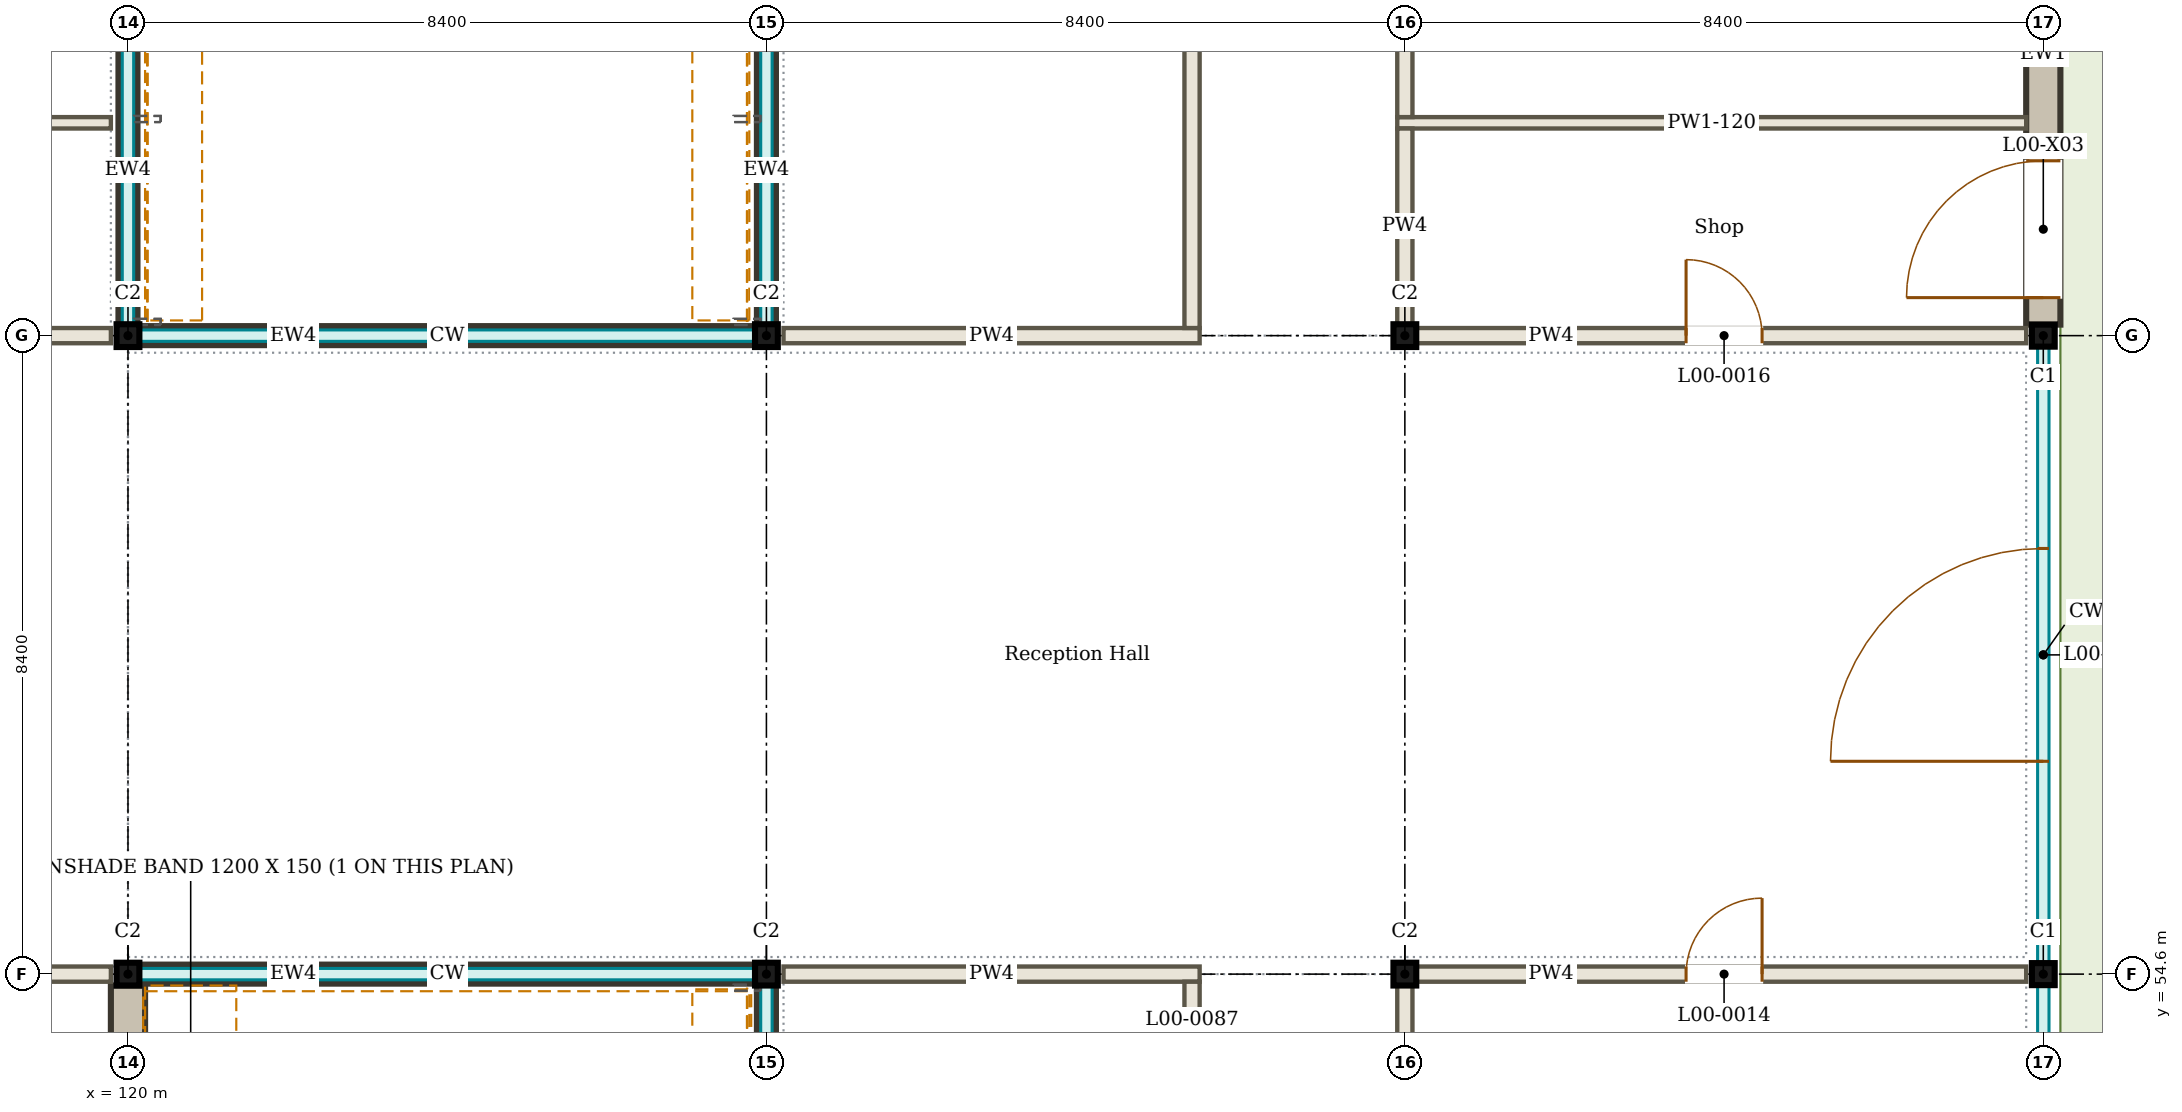
"""IFC4 building model, lengths in metres.
Left out: names, types, materials, properties, quantities, classifications, styles, units other than length and angle.
Written with IfcOpenShell. Run it as: python <this file> out.ifc"""

import sys

from ifc_helpers import new_model, si_unit, direction, frame, frame_2d, origin, origin_2d, place, context, subcontext, project, spatial, rectangle, i_section, extrude, element, fill, save


model = new_model("IFC4")
c1 = context("Model", 3, precision=1e-05, world=origin(), true_north=direction((0.0, 1.0)))
c2 = subcontext(c1, "Body", "Model", "MODEL_VIEW")
j1 = project(units=[si_unit("LENGTHUNIT", "METRE"), si_unit("PLANEANGLEUNIT", "RADIAN")], contexts=[c1])
p1 = place(None, origin())
s1 = spatial("IfcSite", under=j1, at=p1, CompositionType="ELEMENT")
p2 = place(p1, origin())
s2 = spatial("IfcBuilding", under=s1, at=p2, CompositionType="ELEMENT")
p3 = place(p2, origin())
s3 = spatial("IfcBuildingStorey", under=s2, at=p3, CompositionType="ELEMENT", Elevation=0.0)
for number, where, z_axis, x_axis in (
    (1, (120.0, 54.6, 0.0), (0.0, 0.0, 1.0), (1.0, 0.0, 0.0)),
    (2, (128.4, 54.6, 0.0), (0.0, 0.0, 1.0), (1.0, 0.0, 0.0)),
    (3, (136.8, 54.6, 0.0), (0.0, 0.0, 1.0), (1.0, 0.0, 0.0)),
):
    element("IfcColumn", number, at=place(p3, frame(where, z_axis=z_axis, x_axis=x_axis)), inside=s3, PredefinedType="COLUMN", context=c2, shape_type="SweptSolid", body=[
        extrude(i_section(OverallWidth=0.3, OverallDepth=0.3, WebThickness=0.011, FlangeThickness=0.019, FilletRadius=0.027, at=origin_2d()), origin(), (0.0, 0.0, 1.0), 4.5),
    ])
p4 = place(p3, frame((145.2, 54.6, 0.0), z_axis=(0.0, 0.0, 1.0), x_axis=(1.0, 0.0, 0.0)))
e4 = element("IfcColumn", 4, at=p4, inside=s3, PredefinedType="COLUMN", context=c2, shape_type="SweptSolid", body=[
    extrude(i_section(OverallWidth=0.3, OverallDepth=0.29, WebThickness=0.009, FlangeThickness=0.014, FilletRadius=0.027, at=origin_2d()), origin(), (0.0, 0.0, 1.0), 4.5),
])
for number, where, z_axis, x_axis in (
    (5, (120.0, 63.0, 0.0), (0.0, 0.0, 1.0), (1.0, 0.0, 0.0)),
    (6, (128.4, 63.0, 0.0), (0.0, 0.0, 1.0), (1.0, 0.0, 0.0)),
    (7, (136.8, 63.0, 0.0), (0.0, 0.0, 1.0), (1.0, 0.0, 0.0)),
):
    element("IfcColumn", number, at=place(p3, frame(where, z_axis=z_axis, x_axis=x_axis)), inside=s3, PredefinedType="COLUMN", context=c2, shape_type="SweptSolid", body=[
        extrude(i_section(OverallWidth=0.3, OverallDepth=0.3, WebThickness=0.011, FlangeThickness=0.019, FilletRadius=0.027, at=origin_2d()), origin(), (0.0, 0.0, 1.0), 4.5),
    ])
p5 = place(p3, frame((145.2, 63.0, 0.0), z_axis=(0.0, 0.0, 1.0), x_axis=(1.0, 0.0, 0.0)))
e8 = element("IfcColumn", 8, at=p5, inside=s3, PredefinedType="COLUMN", context=c2, shape_type="SweptSolid", body=[
    extrude(i_section(OverallWidth=0.3, OverallDepth=0.29, WebThickness=0.009, FlangeThickness=0.014, FilletRadius=0.027, at=origin_2d()), origin(), (0.0, 0.0, 1.0), 4.5),
])
p6 = place(p3, frame((120.0, 46.35, 0.0), z_axis=(0.0, 0.0, 1.0), x_axis=(0.0, 1.0, 0.0)))
e9 = element("IfcWall", 9, at=p6, inside=s3, PredefinedType="SOLIDWALL", context=c2, shape_type="SweptSolid", body=[
    extrude(rectangle(XDim=8.1, YDim=0.45, at=frame_2d((4.05, 0.0))), origin(), (0.0, 0.0, 1.0), 3.8),
])
p7 = place(p6, frame((0.45, 0.0, 0.9)))
e10 = element("IfcOpeningElement", 10, at=p7, cuts=e9, PredefinedType="OPENING", context=c2, shape_type="SweptSolid", body=[
    extrude(rectangle(XDim=1.6, YDim=1.2, at=frame_2d((0.8, 0.6))), frame((0.0, 0.235, 0.0), z_axis=(0.0, -1.0, 0.0), x_axis=(1.0, 0.0, 0.0)), (0.0, 0.0, 1.0), 0.47),
])
p8 = place(p6, frame((3.15, 0.0, 0.6)))
e11 = element("IfcOpeningElement", 11, at=p8, cuts=e9, PredefinedType="OPENING", context=c2, shape_type="SweptSolid", body=[
    extrude(rectangle(XDim=1.8, YDim=2.4, at=frame_2d((0.9, 1.2))), frame((0.0, 0.235, 0.0), z_axis=(0.0, -1.0, 0.0), x_axis=(1.0, 0.0, 0.0)), (0.0, 0.0, 1.0), 0.47),
])
p9 = place(p6, frame((6.55, 0.0, 2.1)))
e12 = element("IfcOpeningElement", 12, at=p9, cuts=e9, PredefinedType="OPENING", context=c2, shape_type="SweptSolid", body=[
    extrude(rectangle(XDim=0.6, YDim=1.2, at=frame_2d((0.3, 0.6))), frame((0.0, 0.235, 0.0), z_axis=(0.0, -1.0, 0.0), x_axis=(1.0, 0.0, 0.0)), (0.0, 0.0, 1.0), 0.47),
])
p10 = place(p3, frame((120.16, 46.35, 3.82), z_axis=(0.0, 0.0, 1.0), x_axis=(0.0, 1.0, 0.0)))
e13 = element("IfcWall", 13, at=p10, inside=s3, PredefinedType="SOLIDWALL", context=c2, shape_type="SweptSolid", body=[
    extrude(rectangle(XDim=8.1, YDim=0.13, at=frame_2d((4.05, 0.0))), origin(), (0.0, 0.0, 1.0), 0.68),
])
p11 = place(p3, frame((145.36, 46.345, 4.202), z_axis=(0.0, 0.0, 1.0), x_axis=(0.0, 1.0, 0.0)))
e14 = element("IfcWall", 14, at=p11, inside=s3, PredefinedType="SOLIDWALL", context=c2, shape_type="SweptSolid", body=[
    extrude(rectangle(XDim=8.11, YDim=0.13, at=frame_2d((4.055, 0.0))), origin(), (0.0, 0.0, 1.0), 0.298),
])
p12 = place(p3, frame((145.36, 54.745, 4.202), z_axis=(0.0, 0.0, 1.0), x_axis=(0.0, 1.0, 0.0)))
e15 = element("IfcWall", 15, at=p12, inside=s3, PredefinedType="SOLIDWALL", context=c2, shape_type="SweptSolid", body=[
    extrude(rectangle(XDim=8.11, YDim=0.13, at=frame_2d((4.055, 0.0))), origin(), (0.0, 0.0, 1.0), 0.298),
])
p13 = place(p3, frame((120.0, 63.15, 0.0), z_axis=(0.0, 0.0, 1.0), x_axis=(0.0, 1.0, 0.0)))
e16 = element("IfcWall", 16, at=p13, inside=s3, PredefinedType="SOLIDWALL", context=c2, shape_type="SweptSolid", body=[
    extrude(rectangle(XDim=8.1, YDim=0.25, at=frame_2d((4.05, 0.0))), origin(), (0.0, 0.0, 1.0), 0.45),
])
p14 = place(p3, frame((120.16, 63.15, 3.82), z_axis=(0.0, 0.0, 1.0), x_axis=(0.0, 1.0, 0.0)))
e17 = element("IfcWall", 17, at=p14, inside=s3, PredefinedType="SOLIDWALL", context=c2, shape_type="SweptSolid", body=[
    extrude(rectangle(XDim=8.1, YDim=0.13, at=frame_2d((4.05, 0.0))), origin(), (0.0, 0.0, 1.0), 0.68),
])
p15 = place(p3, frame((145.2, 63.145, 0.0), z_axis=(0.0, 0.0, 1.0), x_axis=(0.0, 1.0, 0.0)))
e18 = element("IfcWall", 18, at=p15, inside=s3, PredefinedType="SOLIDWALL", context=c2, shape_type="SweptSolid", body=[
    extrude(rectangle(XDim=8.255, YDim=0.45, at=frame_2d((4.127, 0.0))), origin(), (0.0, 0.0, 1.0), 3.85),
])
p16 = place(p15, frame((0.355, 0.0, 0.0)))
e19 = element("IfcOpeningElement", 19, at=p16, cuts=e18, PredefinedType="OPENING", context=c2, shape_type="SweptSolid", body=[
    extrude(rectangle(XDim=1.8, YDim=2.1, at=frame_2d((0.9, 1.05))), frame((0.0, 0.235, 0.0), z_axis=(0.0, -1.0, 0.0), x_axis=(1.0, 0.0, 0.0)), (0.0, 0.0, 1.0), 0.47),
])
p17 = place(p15, frame((4.955, 0.0, 0.0)))
e20 = element("IfcOpeningElement", 20, at=p17, cuts=e18, PredefinedType="OPENING", context=c2, shape_type="SweptSolid", body=[
    extrude(rectangle(XDim=1.0, YDim=2.1, at=frame_2d((0.5, 1.05))), frame((0.0, 0.235, 0.0), z_axis=(0.0, -1.0, 0.0), x_axis=(1.0, 0.0, 0.0)), (0.0, 0.0, 1.0), 0.47),
])
p18 = place(p3, frame((145.36, 63.145, 4.202), z_axis=(0.0, 0.0, 1.0), x_axis=(0.0, 1.0, 0.0)))
e21 = element("IfcWall", 21, at=p18, inside=s3, PredefinedType="SOLIDWALL", context=c2, shape_type="SweptSolid", body=[
    extrude(rectangle(XDim=8.255, YDim=0.13, at=frame_2d((4.127, 0.0))), origin(), (0.0, 0.0, 1.0), 0.298),
])
p19 = place(p3, frame((120.15, 63.0, 0.0), z_axis=(0.0, 0.0, 1.0), x_axis=(1.0, 0.0, 0.0)))
e22 = element("IfcWall", 22, at=p19, inside=s3, PredefinedType="SOLIDWALL", context=c2, shape_type="SweptSolid", body=[
    extrude(rectangle(XDim=8.1, YDim=0.25, at=frame_2d((4.05, 0.0))), origin(), (0.0, 0.0, 1.0), 0.45),
])
p20 = place(p3, frame((120.15, 63.16, 3.82), z_axis=(0.0, 0.0, 1.0), x_axis=(1.0, 0.0, 0.0)))
e23 = element("IfcWall", 23, at=p20, inside=s3, PredefinedType="SOLIDWALL", context=c2, shape_type="SweptSolid", body=[
    extrude(rectangle(XDim=8.1, YDim=0.13, at=frame_2d((4.05, 0.0))), origin(), (0.0, 0.0, 1.0), 0.68),
])
p21 = place(p3, frame((120.15, 54.6, 0.0), z_axis=(0.0, 0.0, 1.0), x_axis=(1.0, 0.0, 0.0)))
e24 = element("IfcWall", 24, at=p21, inside=s3, PredefinedType="SOLIDWALL", context=c2, shape_type="SweptSolid", body=[
    extrude(rectangle(XDim=8.1, YDim=0.25, at=frame_2d((4.05, 0.0))), origin(), (0.0, 0.0, 1.0), 0.45),
])
p22 = place(p3, frame((120.15, 54.44, 3.82), z_axis=(0.0, 0.0, 1.0), x_axis=(1.0, 0.0, 0.0)))
e25 = element("IfcWall", 25, at=p22, inside=s3, PredefinedType="SOLIDWALL", context=c2, shape_type="SweptSolid", body=[
    extrude(rectangle(XDim=8.1, YDim=0.13, at=frame_2d((4.05, 0.0))), origin(), (0.0, 0.0, 1.0), 0.68),
])
p23 = place(p3, frame((128.4, 46.35, 0.0), z_axis=(0.0, 0.0, 1.0), x_axis=(0.0, 1.0, 0.0)))
e26 = element("IfcWall", 26, at=p23, inside=s3, PredefinedType="SOLIDWALL", context=c2, shape_type="SweptSolid", body=[
    extrude(rectangle(XDim=8.1, YDim=0.25, at=frame_2d((4.05, 0.0))), origin(), (0.0, 0.0, 1.0), 0.45),
])
p24 = place(p3, frame((128.24, 46.35, 3.82), z_axis=(0.0, 0.0, 1.0), x_axis=(0.0, 1.0, 0.0)))
e27 = element("IfcWall", 27, at=p24, inside=s3, PredefinedType="SOLIDWALL", context=c2, shape_type="SweptSolid", body=[
    extrude(rectangle(XDim=8.1, YDim=0.13, at=frame_2d((4.05, 0.0))), origin(), (0.0, 0.0, 1.0), 0.68),
])
p25 = place(p3, frame((128.4, 63.15, 0.0), z_axis=(0.0, 0.0, 1.0), x_axis=(0.0, 1.0, 0.0)))
e28 = element("IfcWall", 28, at=p25, inside=s3, PredefinedType="SOLIDWALL", context=c2, shape_type="SweptSolid", body=[
    extrude(rectangle(XDim=8.1, YDim=0.25, at=frame_2d((4.05, 0.0))), origin(), (0.0, 0.0, 1.0), 0.45),
])
p26 = place(p3, frame((128.24, 63.15, 3.82), z_axis=(0.0, 0.0, 1.0), x_axis=(0.0, 1.0, 0.0)))
e29 = element("IfcWall", 29, at=p26, inside=s3, PredefinedType="SOLIDWALL", context=c2, shape_type="SweptSolid", body=[
    extrude(rectangle(XDim=8.1, YDim=0.13, at=frame_2d((4.05, 0.0))), origin(), (0.0, 0.0, 1.0), 0.68),
])
p27 = place(p3, frame((114.3, 54.6, 0.0), z_axis=(0.0, 0.0, 1.0), x_axis=(1.0, 0.0, 0.0)))
e30 = element("IfcWall", 30, at=p27, inside=s3, PredefinedType="PARTITIONING", context=c2, shape_type="SweptSolid", body=[
    extrude(rectangle(XDim=5.475, YDim=0.2, at=frame_2d((2.737, 0.0))), origin(), (0.0, 0.0, 1.0), 3.8),
])
p28 = place(p27, frame((2.5, 0.0, 0.0)))
e31 = element("IfcOpeningElement", 31, at=p28, cuts=e30, PredefinedType="OPENING", context=c2, shape_type="SweptSolid", body=[
    extrude(rectangle(XDim=0.8, YDim=2.1, at=frame_2d((0.4, 1.05))), frame((0.0, 0.11, 0.0), z_axis=(0.0, -1.0, 0.0), x_axis=(1.0, 0.0, 0.0)), (0.0, 0.0, 1.0), 0.22),
])
p29 = place(p3, frame((128.625, 54.6, 0.0), z_axis=(0.0, 0.0, 1.0), x_axis=(1.0, 0.0, 0.0)))
e32 = element("IfcWall", 32, at=p29, inside=s3, PredefinedType="PARTITIONING", context=c2, shape_type="SweptSolid", body=[
    extrude(rectangle(XDim=5.475, YDim=0.2, at=frame_2d((2.738, 0.0))), origin(), (0.0, 0.0, 1.0), 3.8),
])
p30 = place(p3, frame((136.95, 54.6, 0.0), z_axis=(0.0, 0.0, 1.0), x_axis=(1.0, 0.0, 0.0)))
e33 = element("IfcWall", 33, at=p30, inside=s3, PredefinedType="PARTITIONING", context=c2, shape_type="SweptSolid", body=[
    extrude(rectangle(XDim=8.025, YDim=0.2, at=frame_2d((4.013, 0.0))), origin(), (0.0, 0.0, 1.0), 3.8),
])
p31 = place(p30, frame((3.55, 0.0, 0.0)))
e34 = element("IfcOpeningElement", 34, at=p31, cuts=e33, PredefinedType="OPENING", context=c2, shape_type="SweptSolid", body=[
    extrude(rectangle(XDim=1.0, YDim=2.1, at=frame_2d((0.5, 1.05))), frame((0.0, 0.11, 0.0), z_axis=(0.0, -1.0, 0.0), x_axis=(1.0, 0.0, 0.0)), (0.0, 0.0, 1.0), 0.22),
])
p32 = place(p3, frame((114.3, 63.0, 0.0), z_axis=(0.0, 0.0, 1.0), x_axis=(1.0, 0.0, 0.0)))
e35 = element("IfcWall", 35, at=p32, inside=s3, PredefinedType="PARTITIONING", context=c2, shape_type="SweptSolid", body=[
    extrude(rectangle(XDim=5.475, YDim=0.2, at=frame_2d((2.737, 0.0))), origin(), (0.0, 0.0, 1.0), 3.8),
])
p33 = place(p32, frame((2.4, 0.0, 0.0)))
e36 = element("IfcOpeningElement", 36, at=p33, cuts=e35, PredefinedType="OPENING", context=c2, shape_type="SweptSolid", body=[
    extrude(rectangle(XDim=1.0, YDim=2.1, at=frame_2d((0.5, 1.05))), frame((0.0, 0.11, 0.0), z_axis=(0.0, -1.0, 0.0), x_axis=(1.0, 0.0, 0.0)), (0.0, 0.0, 1.0), 0.22),
])
p34 = place(p3, frame((128.625, 63.0, 0.0), z_axis=(0.0, 0.0, 1.0), x_axis=(1.0, 0.0, 0.0)))
e37 = element("IfcWall", 37, at=p34, inside=s3, PredefinedType="PARTITIONING", context=c2, shape_type="SweptSolid", body=[
    extrude(rectangle(XDim=5.475, YDim=0.2, at=frame_2d((2.738, 0.0))), origin(), (0.0, 0.0, 1.0), 3.8),
])
p35 = place(p3, frame((136.95, 63.0, 0.0), z_axis=(0.0, 0.0, 1.0), x_axis=(1.0, 0.0, 0.0)))
e38 = element("IfcWall", 38, at=p35, inside=s3, PredefinedType="PARTITIONING", context=c2, shape_type="SweptSolid", body=[
    extrude(rectangle(XDim=8.025, YDim=0.2, at=frame_2d((4.013, 0.0))), origin(), (0.0, 0.0, 1.0), 3.8),
])
p36 = place(p35, frame((3.55, 0.0, 0.0)))
e39 = element("IfcOpeningElement", 39, at=p36, cuts=e38, PredefinedType="OPENING", context=c2, shape_type="SweptSolid", body=[
    extrude(rectangle(XDim=1.0, YDim=2.1, at=frame_2d((0.5, 1.05))), frame((0.0, 0.11, 0.0), z_axis=(0.0, -1.0, 0.0), x_axis=(1.0, 0.0, 0.0)), (0.0, 0.0, 1.0), 0.22),
])
p37 = place(p3, frame((114.3, 65.8, 0.0), z_axis=(0.0, 0.0, 1.0), x_axis=(1.0, 0.0, 0.0)))
e40 = element("IfcWall", 40, at=p37, inside=s3, PredefinedType="PARTITIONING", context=c2, shape_type="SweptSolid", body=[
    extrude(rectangle(XDim=5.475, YDim=0.15, at=frame_2d((2.737, 0.0))), origin(), (0.0, 0.0, 1.0), 3.95),
])
p38 = place(p3, frame((136.7, 65.8, 0.0), z_axis=(0.0, 0.0, 1.0), x_axis=(1.0, 0.0, 0.0)))
e41 = element("IfcWall", 41, at=p38, inside=s3, PredefinedType="PARTITIONING", context=c2, shape_type="SweptSolid", body=[
    extrude(rectangle(XDim=8.275, YDim=0.15, at=frame_2d((4.138, 0.0))), origin(), (0.0, 0.0, 1.0), 3.8),
])
p39 = place(p3, frame((134.0, 51.875, 0.0), z_axis=(0.0, 0.0, 1.0), x_axis=(0.0, 1.0, 0.0)))
e42 = element("IfcWall", 42, at=p39, inside=s3, PredefinedType="PARTITIONING", context=c2, shape_type="SweptSolid", body=[
    extrude(rectangle(XDim=2.625, YDim=0.2, at=frame_2d((1.312, 0.0))), origin(), (0.0, 0.0, 1.0), 3.8),
])
p40 = place(p39, frame((0.875, 0.0, 0.0)))
e43 = element("IfcOpeningElement", 43, at=p40, cuts=e42, PredefinedType="OPENING", context=c2, shape_type="SweptSolid", body=[
    extrude(rectangle(XDim=0.9, YDim=2.1, at=frame_2d((0.45, 1.05))), frame((0.0, 0.11, 0.0), z_axis=(0.0, -1.0, 0.0), x_axis=(1.0, 0.0, 0.0)), (0.0, 0.0, 1.0), 0.22),
])
p41 = place(p3, frame((134.0, 63.1, 0.0), z_axis=(0.0, 0.0, 1.0), x_axis=(0.0, 1.0, 0.0)))
e44 = element("IfcWall", 44, at=p41, inside=s3, PredefinedType="PARTITIONING", context=c2, shape_type="SweptSolid", body=[
    extrude(rectangle(XDim=16.55, YDim=0.2, at=frame_2d((8.275, 0.0))), origin(), (0.0, 0.0, 1.0), 3.8),
])
p42 = place(p41, frame((7.8, 0.0, 0.0)))
e45 = element("IfcOpeningElement", 45, at=p42, cuts=e44, PredefinedType="OPENING", context=c2, shape_type="SweptSolid", body=[
    extrude(rectangle(XDim=1.0, YDim=2.1, at=frame_2d((0.5, 1.05))), frame((0.0, 0.11, 0.0), z_axis=(0.0, -1.0, 0.0), x_axis=(1.0, 0.0, 0.0)), (0.0, 0.0, 1.0), 0.22),
])
p43 = place(p3, frame((136.8, 46.35, 0.0), z_axis=(0.0, 0.0, 1.0), x_axis=(0.0, 1.0, 0.0)))
e46 = element("IfcWall", 46, at=p43, inside=s3, PredefinedType="PARTITIONING", context=c2, shape_type="SweptSolid", body=[
    extrude(rectangle(XDim=8.1, YDim=0.2, at=frame_2d((4.05, 0.0))), origin(), (0.0, 0.0, 1.0), 3.8),
])
p44 = place(p3, frame((136.8, 63.15, 0.0), z_axis=(0.0, 0.0, 1.0), x_axis=(0.0, 1.0, 0.0)))
e47 = element("IfcWall", 47, at=p44, inside=s3, PredefinedType="PARTITIONING", context=c2, shape_type="SweptSolid", body=[
    extrude(rectangle(XDim=2.575, YDim=0.2, at=frame_2d((1.288, 0.0))), origin(), (0.0, 0.0, 1.0), 3.8),
])
p45 = place(p3, frame((136.8, 65.875, 0.0), z_axis=(0.0, 0.0, 1.0), x_axis=(0.0, 1.0, 0.0)))
e48 = element("IfcWall", 48, at=p45, inside=s3, PredefinedType="PARTITIONING", context=c2, shape_type="SweptSolid", body=[
    extrude(rectangle(XDim=5.525, YDim=0.2, at=frame_2d((2.762, 0.0))), origin(), (0.0, 0.0, 1.0), 3.8),
])
p46 = place(p45, frame((2.225, 0.0, 0.0)))
e49 = element("IfcOpeningElement", 49, at=p46, cuts=e48, PredefinedType="OPENING", context=c2, shape_type="SweptSolid", body=[
    extrude(rectangle(XDim=1.0, YDim=2.1, at=frame_2d((0.5, 1.05))), frame((0.0, 0.11, 0.0), z_axis=(0.0, -1.0, 0.0), x_axis=(1.0, 0.0, 0.0)), (0.0, 0.0, 1.0), 0.22),
])
p47 = place(p3, frame((145.2, 54.745, 0.0), z_axis=(0.0, 0.0, 1.0), x_axis=(0.0, 1.0, 0.0)))
p48 = place(p47, frame((2.655, 0.0, 0.0)))
p49 = place(p48, origin())
e50 = element("IfcDoor", 50, at=p49, inside=s3, OperationType="SINGLE_SWING_LEFT", PredefinedType="DOOR", context=c2, shape_type="SweptSolid", body=[
    extrude(rectangle(XDim=2.8, YDim=2.4, at=frame_2d((1.4, 1.2))), frame((0.0, 0.025, 0.0), z_axis=(0.0, -1.0, 0.0), x_axis=(1.0, 0.0, 0.0)), (0.0, 0.0, 1.0), 0.05),
])
p50 = place(p16, origin())
e51 = element("IfcDoor", 51, at=p50, inside=s3, OperationType="SINGLE_SWING_LEFT", PredefinedType="DOOR", context=c2, shape_type="SweptSolid", body=[
    extrude(rectangle(XDim=1.8, YDim=2.1, at=frame_2d((0.9, 1.05))), frame((0.0, 0.025, 0.0), z_axis=(0.0, -1.0, 0.0), x_axis=(1.0, 0.0, 0.0)), (0.0, 0.0, 1.0), 0.05),
])
fill(e19, e51)
p51 = place(p31, origin())
e52 = element("IfcDoor", 52, at=p51, inside=s3, OperationType="SINGLE_SWING_RIGHT", PredefinedType="DOOR", context=c2, shape_type="SweptSolid", body=[
    extrude(rectangle(XDim=1.0, YDim=2.1, at=frame_2d((0.5, 1.05))), frame((0.0, 0.025, 0.0), z_axis=(0.0, -1.0, 0.0), x_axis=(1.0, 0.0, 0.0)), (0.0, 0.0, 1.0), 0.05),
])
fill(e34, e52)
p52 = place(p36, origin())
e53 = element("IfcDoor", 53, at=p52, inside=s3, OperationType="SINGLE_SWING_LEFT", PredefinedType="DOOR", context=c2, shape_type="SweptSolid", body=[
    extrude(rectangle(XDim=1.0, YDim=2.1, at=frame_2d((0.5, 1.05))), frame((0.0, 0.025, 0.0), z_axis=(0.0, -1.0, 0.0), x_axis=(1.0, 0.0, 0.0)), (0.0, 0.0, 1.0), 0.05),
])
fill(e39, e53)
save(model, sys.argv[1])
